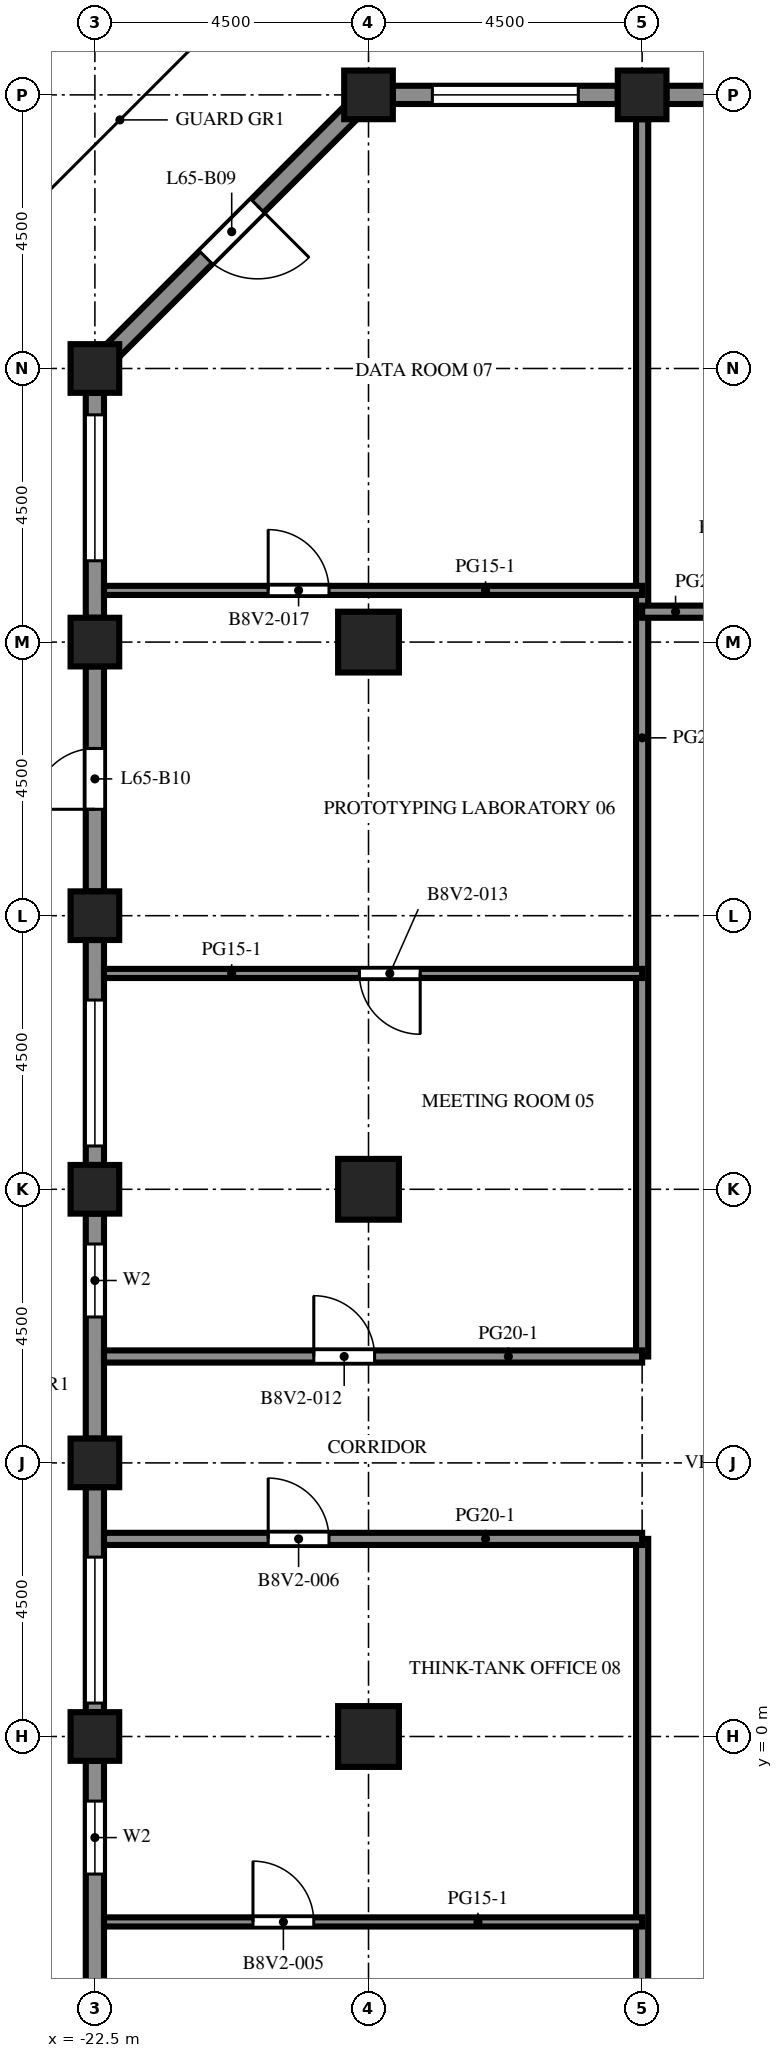
"""IFC4 building model, lengths in metres.
Left out: names, types, materials, properties, quantities, classifications, styles, units other than length and angle.
Written with IfcOpenShell. Run it as: python <this file> out.ifc"""

import sys

from ifc_helpers import new_model, si_unit, direction, frame, frame_2d, origin, origin_2d, place, context, subcontext, project, spatial, rectangle, extrude, element, fill, save


model = new_model("IFC4")
c1 = context("Model", 3, precision=1e-05, world=origin(), true_north=direction((0.0, 1.0)))
c2 = subcontext(c1, "Body", "Model", "MODEL_VIEW")
j1 = project(units=[si_unit("LENGTHUNIT", "METRE"), si_unit("PLANEANGLEUNIT", "RADIAN")], contexts=[c1])
p1 = place(None, origin())
s1 = spatial("IfcSite", under=j1, at=p1, CompositionType="ELEMENT")
p2 = place(p1, origin())
s2 = spatial("IfcBuilding", under=s1, at=p2, CompositionType="ELEMENT")
p3 = place(p2, frame((0.0, 0.0, 286.8)))
s3 = spatial("IfcBuildingStorey", under=s2, at=p3, CompositionType="ELEMENT", Elevation=286.8)
for number, where, z_axis, x_axis in (
    (1, (-22.5, 0.0, 0.0), (0.0, 0.0, 1.0), (1.0, 0.0, 0.0)),
    (2, (-22.5, 4.5, 0.0), (0.0, 0.0, 1.0), (1.0, 0.0, 0.0)),
    (3, (-22.5, 9.0, 0.0), (0.0, 0.0, 1.0), (1.0, 0.0, 0.0)),
    (4, (-22.5, 13.5, 0.0), (0.0, 0.0, 1.0), (1.0, 0.0, 0.0)),
    (5, (-22.5, 18.0, 0.0), (0.0, 0.0, 1.0), (1.0, 0.0, 0.0)),
    (6, (-22.5, 22.5, 0.0), (0.0, 0.0, 1.0), (1.0, 0.0, 0.0)),
    (7, (-18.0, 27.0, 0.0), (0.0, 0.0, 1.0), (1.0, 0.0, 0.0)),
    (8, (-13.5, 27.0, 0.0), (0.0, 0.0, 1.0), (1.0, 0.0, 0.0)),
):
    element("IfcColumn", number, at=place(p3, frame(where, z_axis=z_axis, x_axis=x_axis)), inside=s3, PredefinedType="COLUMN", context=c2, shape_type="SweptSolid", body=[
        extrude(rectangle(XDim=0.8, YDim=0.8, at=origin_2d()), origin(), (0.0, 0.0, 1.0), 4.1),
    ])
for number, where, z_axis, x_axis in (
    (9, (-18.0, 0.0, 0.0), (0.0, 0.0, 1.0), (1.0, 0.0, 0.0)),
    (10, (-18.0, 9.0, 0.0), (0.0, 0.0, 1.0), (1.0, 0.0, 0.0)),
    (11, (-18.0, 18.0, 0.0), (0.0, 0.0, 1.0), (1.0, 0.0, 0.0)),
):
    element("IfcColumn", number, at=place(p3, frame(where, z_axis=z_axis, x_axis=x_axis)), inside=s3, PredefinedType="COLUMN", context=c2, shape_type="SweptSolid", body=[
        extrude(rectangle(XDim=1.0, YDim=1.0, at=origin_2d()), origin(), (0.0, 0.0, 1.0), 4.1),
    ])
p4 = place(p3, frame((-13.1, 27.0, 0.0), z_axis=(0.0, 0.0, 1.0), x_axis=(1.0, 0.0, 0.0)))
e12 = element("IfcWall", 12, at=p4, inside=s3, PredefinedType="SOLIDWALL", context=c2, shape_type="SweptSolid", body=[
    extrude(rectangle(XDim=3.7, YDim=0.3, at=frame_2d((1.85, 0.0))), origin(), (0.0, 0.0, 1.0), 2.85),
])
p5 = place(p4, frame((1.35, 0.0, 0.0)))
e13 = element("IfcOpeningElement", 13, at=p5, cuts=e12, PredefinedType="OPENING", context=c2, shape_type="SweptSolid", body=[
    extrude(rectangle(XDim=1.0, YDim=2.2, at=frame_2d((0.5, 1.1))), frame((0.0, 0.16, 0.0), z_axis=(0.0, -1.0, 0.0), x_axis=(1.0, 0.0, 0.0)), (0.0, 0.0, 1.0), 0.32),
])
p6 = place(p3, frame((-17.6, 27.0, 0.0), z_axis=(0.0, 0.0, 1.0), x_axis=(1.0, 0.0, 0.0)))
e14 = element("IfcWall", 14, at=p6, inside=s3, PredefinedType="SOLIDWALL", context=c2, shape_type="SweptSolid", body=[
    extrude(rectangle(XDim=3.7, YDim=0.3, at=frame_2d((1.85, 0.0))), origin(), (0.0, 0.0, 1.0), 2.85),
])
p7 = place(p6, frame((0.65, 0.0, 0.8)))
e15 = element("IfcOpeningElement", 15, at=p7, cuts=e14, PredefinedType="OPENING", context=c2, shape_type="SweptSolid", body=[
    extrude(rectangle(XDim=2.4, YDim=1.7, at=frame_2d((1.2, 0.85))), frame((0.0, 0.16, 0.0), z_axis=(0.0, -1.0, 0.0), x_axis=(1.0, 0.0, 0.0)), (0.0, 0.0, 1.0), 0.32),
])
p8 = place(p3, frame((-22.206, 22.794, 0.0), z_axis=(0.0, 0.0, 1.0), x_axis=(0.707106781187, 0.707106781187, 0.0)))
e16 = element("IfcWall", 16, at=p8, inside=s3, PredefinedType="SOLIDWALL", context=c2, shape_type="SweptSolid", body=[
    extrude(rectangle(XDim=5.532, YDim=0.3, at=frame_2d((2.766, 0.0))), origin(), (0.0, 0.0, 1.0), 2.85),
])
p9 = place(p8, frame((2.166, 0.0, 0.0)))
e17 = element("IfcOpeningElement", 17, at=p9, cuts=e16, PredefinedType="OPENING", context=c2, shape_type="SweptSolid", body=[
    extrude(rectangle(XDim=1.2, YDim=2.2, at=frame_2d((0.6, 1.1))), frame((0.0, 0.16, 0.0), z_axis=(0.0, -1.0, 0.0), x_axis=(1.0, 0.0, 0.0)), (0.0, 0.0, 1.0), 0.32),
])
p10 = place(p3, frame((-22.5, 18.4, 0.0), z_axis=(0.0, 0.0, 1.0), x_axis=(0.0, 1.0, 0.0)))
e18 = element("IfcWall", 18, at=p10, inside=s3, PredefinedType="SOLIDWALL", context=c2, shape_type="SweptSolid", body=[
    extrude(rectangle(XDim=3.7, YDim=0.3, at=frame_2d((1.85, 0.0))), origin(), (0.0, 0.0, 1.0), 2.85),
])
p11 = place(p10, frame((0.938, 0.0, 0.8)))
e19 = element("IfcOpeningElement", 19, at=p11, cuts=e18, PredefinedType="OPENING", context=c2, shape_type="SweptSolid", body=[
    extrude(rectangle(XDim=2.4, YDim=1.7, at=frame_2d((1.2, 0.85))), frame((0.0, 0.16, 0.0), z_axis=(0.0, -1.0, 0.0), x_axis=(1.0, 0.0, 0.0)), (0.0, 0.0, 1.0), 0.32),
])
p12 = place(p3, frame((-22.5, 13.9, 0.0), z_axis=(0.0, 0.0, 1.0), x_axis=(0.0, 1.0, 0.0)))
e20 = element("IfcWall", 20, at=p12, inside=s3, PredefinedType="SOLIDWALL", context=c2, shape_type="SweptSolid", body=[
    extrude(rectangle(XDim=3.7, YDim=0.3, at=frame_2d((1.85, 0.0))), origin(), (0.0, 0.0, 1.0), 2.85),
])
p13 = place(p12, frame((1.35, 0.0, 0.0)))
e21 = element("IfcOpeningElement", 21, at=p13, cuts=e20, PredefinedType="OPENING", context=c2, shape_type="SweptSolid", body=[
    extrude(rectangle(XDim=1.0, YDim=2.2, at=frame_2d((0.5, 1.1))), frame((0.0, 0.16, 0.0), z_axis=(0.0, -1.0, 0.0), x_axis=(1.0, 0.0, 0.0)), (0.0, 0.0, 1.0), 0.32),
])
p14 = place(p3, frame((-22.5, 9.4, 0.0), z_axis=(0.0, 0.0, 1.0), x_axis=(0.0, 1.0, 0.0)))
e22 = element("IfcWall", 22, at=p14, inside=s3, PredefinedType="SOLIDWALL", context=c2, shape_type="SweptSolid", body=[
    extrude(rectangle(XDim=3.7, YDim=0.3, at=frame_2d((1.85, 0.0))), origin(), (0.0, 0.0, 1.0), 2.85),
])
p15 = place(p14, frame((0.312, 0.0, 0.8)))
e23 = element("IfcOpeningElement", 23, at=p15, cuts=e22, PredefinedType="OPENING", context=c2, shape_type="SweptSolid", body=[
    extrude(rectangle(XDim=2.4, YDim=1.7, at=frame_2d((1.2, 0.85))), frame((0.0, 0.16, 0.0), z_axis=(0.0, -1.0, 0.0), x_axis=(1.0, 0.0, 0.0)), (0.0, 0.0, 1.0), 0.32),
])
p16 = place(p3, frame((-22.5, 4.9, 0.0), z_axis=(0.0, 0.0, 1.0), x_axis=(0.0, 1.0, 0.0)))
e24 = element("IfcWall", 24, at=p16, inside=s3, PredefinedType="SOLIDWALL", context=c2, shape_type="SweptSolid", body=[
    extrude(rectangle(XDim=3.7, YDim=0.3, at=frame_2d((1.85, 0.0))), origin(), (0.0, 0.0, 1.0), 2.85),
])
p17 = place(p16, frame((2.0, 0.0, 0.8)))
e25 = element("IfcOpeningElement", 25, at=p17, cuts=e24, PredefinedType="OPENING", context=c2, shape_type="SweptSolid", body=[
    extrude(rectangle(XDim=1.2, YDim=1.7, at=frame_2d((0.6, 0.85))), frame((0.0, 0.16, 0.0), z_axis=(0.0, -1.0, 0.0), x_axis=(1.0, 0.0, 0.0)), (0.0, 0.0, 1.0), 0.32),
])
p18 = place(p3, frame((-22.5, 0.4, 0.0), z_axis=(0.0, 0.0, 1.0), x_axis=(0.0, 1.0, 0.0)))
e26 = element("IfcWall", 26, at=p18, inside=s3, PredefinedType="SOLIDWALL", context=c2, shape_type="SweptSolid", body=[
    extrude(rectangle(XDim=3.7, YDim=0.3, at=frame_2d((1.85, 0.0))), origin(), (0.0, 0.0, 1.0), 2.85),
])
p19 = place(p18, frame((0.15, 0.0, 0.8)))
e27 = element("IfcOpeningElement", 27, at=p19, cuts=e26, PredefinedType="OPENING", context=c2, shape_type="SweptSolid", body=[
    extrude(rectangle(XDim=2.4, YDim=1.7, at=frame_2d((1.2, 0.85))), frame((0.0, 0.16, 0.0), z_axis=(0.0, -1.0, 0.0), x_axis=(1.0, 0.0, 0.0)), (0.0, 0.0, 1.0), 0.32),
])
p20 = place(p3, frame((-22.5, -4.1, 0.0), z_axis=(0.0, 0.0, 1.0), x_axis=(0.0, 1.0, 0.0)))
e28 = element("IfcWall", 28, at=p20, inside=s3, PredefinedType="SOLIDWALL", context=c2, shape_type="SweptSolid", body=[
    extrude(rectangle(XDim=3.7, YDim=0.3, at=frame_2d((1.85, 0.0))), origin(), (0.0, 0.0, 1.0), 2.85),
])
p21 = place(p20, frame((1.837, 0.0, 0.8)))
e29 = element("IfcOpeningElement", 29, at=p21, cuts=e28, PredefinedType="OPENING", context=c2, shape_type="SweptSolid", body=[
    extrude(rectangle(XDim=1.2, YDim=1.7, at=frame_2d((0.6, 0.85))), frame((0.0, 0.16, 0.0), z_axis=(0.0, -1.0, 0.0), x_axis=(1.0, 0.0, 0.0)), (0.0, 0.0, 1.0), 0.32),
])
p22 = place(p3, frame((-13.5, -17.6, 0.0), z_axis=(0.0, 0.0, 1.0), x_axis=(0.0, 1.0, 0.0)))
e30 = element("IfcWall", 30, at=p22, inside=s3, PredefinedType="PARTITIONING", context=c2, shape_type="SweptSolid", body=[
    extrude(rectangle(XDim=20.85, YDim=0.2, at=frame_2d((10.425, 0.0))), origin(), (0.0, 0.0, 1.0), 3.65),
])
p23 = place(p3, frame((-13.5, 6.25, 0.0), z_axis=(0.0, 0.0, 1.0), x_axis=(0.0, 1.0, 0.0)))
e31 = element("IfcWall", 31, at=p23, inside=s3, PredefinedType="PARTITIONING", context=c2, shape_type="SweptSolid", body=[
    extrude(rectangle(XDim=20.35, YDim=0.2, at=frame_2d((10.175, 0.0))), origin(), (0.0, 0.0, 1.0), 3.65),
])
p24 = place(p3, frame((-13.5, -3.05, 0.0), z_axis=(0.0, 0.0, 1.0), x_axis=(-1.0, 0.0, 0.0)))
e32 = element("IfcWall", 32, at=p24, inside=s3, PredefinedType="PARTITIONING", context=c2, shape_type="SweptSolid", body=[
    extrude(rectangle(XDim=8.85, YDim=0.15, at=frame_2d((4.425, 0.0))), origin(), (0.0, 0.0, 1.0), 3.65),
])
p25 = place(p24, frame((5.4, 0.0, 0.0)))
e33 = element("IfcOpeningElement", 33, at=p25, cuts=e32, PredefinedType="OPENING", context=c2, shape_type="SweptSolid", body=[
    extrude(rectangle(XDim=1.0, YDim=2.1, at=frame_2d((0.5, 1.05))), frame((0.0, 0.085, 0.0), z_axis=(0.0, -1.0, 0.0), x_axis=(1.0, 0.0, 0.0)), (0.0, 0.0, 1.0), 0.17),
])
p26 = place(p3, frame((-13.5, 3.25, 0.0), z_axis=(0.0, 0.0, 1.0), x_axis=(-1.0, 0.0, 0.0)))
e34 = element("IfcWall", 34, at=p26, inside=s3, PredefinedType="PARTITIONING", context=c2, shape_type="SweptSolid", body=[
    extrude(rectangle(XDim=8.85, YDim=0.2, at=frame_2d((4.425, 0.0))), origin(), (0.0, 0.0, 1.0), 3.65),
])
p27 = place(p26, frame((5.15, 0.0, 0.0)))
e35 = element("IfcOpeningElement", 35, at=p27, cuts=e34, PredefinedType="OPENING", context=c2, shape_type="SweptSolid", body=[
    extrude(rectangle(XDim=1.0, YDim=2.1, at=frame_2d((0.5, 1.05))), frame((0.0, 0.11, 0.0), z_axis=(0.0, -1.0, 0.0), x_axis=(1.0, 0.0, 0.0)), (0.0, 0.0, 1.0), 0.22),
])
p28 = place(p3, frame((-22.35, 6.25, 0.0), z_axis=(0.0, 0.0, 1.0), x_axis=(1.0, 0.0, 0.0)))
e36 = element("IfcWall", 36, at=p28, inside=s3, PredefinedType="PARTITIONING", context=c2, shape_type="SweptSolid", body=[
    extrude(rectangle(XDim=8.85, YDim=0.2, at=frame_2d((4.425, 0.0))), origin(), (0.0, 0.0, 1.0), 3.65),
])
p29 = place(p28, frame((3.45, 0.0, 0.0)))
e37 = element("IfcOpeningElement", 37, at=p29, cuts=e36, PredefinedType="OPENING", context=c2, shape_type="SweptSolid", body=[
    extrude(rectangle(XDim=1.0, YDim=2.1, at=frame_2d((0.5, 1.05))), frame((0.0, 0.11, 0.0), z_axis=(0.0, -1.0, 0.0), x_axis=(1.0, 0.0, 0.0)), (0.0, 0.0, 1.0), 0.22),
])
p30 = place(p3, frame((-22.35, 12.55, 0.0), z_axis=(0.0, 0.0, 1.0), x_axis=(1.0, 0.0, 0.0)))
e38 = element("IfcWall", 38, at=p30, inside=s3, PredefinedType="PARTITIONING", context=c2, shape_type="SweptSolid", body=[
    extrude(rectangle(XDim=8.85, YDim=0.15, at=frame_2d((4.425, 0.0))), origin(), (0.0, 0.0, 1.0), 3.65),
])
p31 = place(p30, frame((4.2, 0.0, 0.0)))
e39 = element("IfcOpeningElement", 39, at=p31, cuts=e38, PredefinedType="OPENING", context=c2, shape_type="SweptSolid", body=[
    extrude(rectangle(XDim=1.0, YDim=2.1, at=frame_2d((0.5, 1.05))), frame((0.0, 0.085, 0.0), z_axis=(0.0, -1.0, 0.0), x_axis=(1.0, 0.0, 0.0)), (0.0, 0.0, 1.0), 0.17),
])
p32 = place(p3, frame((-13.5, 18.5, 0.0), z_axis=(0.0, 0.0, 1.0), x_axis=(1.0, 0.0, 0.0)))
e40 = element("IfcWall", 40, at=p32, inside=s3, PredefinedType="PARTITIONING", context=c2, shape_type="SweptSolid", body=[
    extrude(rectangle(XDim=3.0, YDim=0.2, at=frame_2d((1.5, 0.0))), origin(), (0.0, 0.0, 1.0), 3.65),
])
p33 = place(p32, frame((1.1, 0.0, 0.0)))
e41 = element("IfcOpeningElement", 41, at=p33, cuts=e40, PredefinedType="OPENING", context=c2, shape_type="SweptSolid", body=[
    extrude(rectangle(XDim=1.0, YDim=2.1, at=frame_2d((0.5, 1.05))), frame((0.0, 0.11, 0.0), z_axis=(0.0, -1.0, 0.0), x_axis=(1.0, 0.0, 0.0)), (0.0, 0.0, 1.0), 0.22),
])
p34 = place(p3, frame((-22.35, 18.85, 0.0), z_axis=(0.0, 0.0, 1.0), x_axis=(1.0, 0.0, 0.0)))
e42 = element("IfcWall", 42, at=p34, inside=s3, PredefinedType="PARTITIONING", context=c2, shape_type="SweptSolid", body=[
    extrude(rectangle(XDim=8.85, YDim=0.15, at=frame_2d((4.425, 0.0))), origin(), (0.0, 0.0, 1.0), 3.65),
])
p35 = place(p34, frame((2.7, 0.0, 0.0)))
e43 = element("IfcOpeningElement", 43, at=p35, cuts=e42, PredefinedType="OPENING", context=c2, shape_type="SweptSolid", body=[
    extrude(rectangle(XDim=1.0, YDim=2.1, at=frame_2d((0.5, 1.05))), frame((0.0, 0.085, 0.0), z_axis=(0.0, -1.0, 0.0), x_axis=(1.0, 0.0, 0.0)), (0.0, 0.0, 1.0), 0.17),
])
p36 = place(p7, origin())
e44 = element("IfcWindow", 44, at=p36, inside=s3, PartitioningType="SINGLE_PANEL", PredefinedType="WINDOW", context=c2, shape_type="SweptSolid", body=[
    extrude(rectangle(XDim=2.4, YDim=1.7, at=frame_2d((1.2, 0.85))), frame((0.0, 0.03, 0.0), z_axis=(0.0, -1.0, 0.0), x_axis=(1.0, 0.0, 0.0)), (0.0, 0.0, 1.0), 0.06),
])
fill(e15, e44)
p37 = place(p9, origin())
e45 = element("IfcDoor", 45, at=p37, inside=s3, OperationType="SINGLE_SWING_RIGHT", PredefinedType="DOOR", context=c2, shape_type="SweptSolid", body=[
    extrude(rectangle(XDim=1.2, YDim=2.2, at=frame_2d((0.6, 1.1))), frame((0.0, 0.025, 0.0), z_axis=(0.0, -1.0, 0.0), x_axis=(1.0, 0.0, 0.0)), (0.0, 0.0, 1.0), 0.05),
])
fill(e17, e45)
p38 = place(p11, origin())
e46 = element("IfcWindow", 46, at=p38, inside=s3, PartitioningType="SINGLE_PANEL", PredefinedType="WINDOW", context=c2, shape_type="SweptSolid", body=[
    extrude(rectangle(XDim=2.4, YDim=1.7, at=frame_2d((1.2, 0.85))), frame((0.0, 0.03, 0.0), z_axis=(0.0, -1.0, 0.0), x_axis=(1.0, 0.0, 0.0)), (0.0, 0.0, 1.0), 0.06),
])
fill(e19, e46)
p39 = place(p13, origin())
e47 = element("IfcDoor", 47, at=p39, inside=s3, OperationType="SINGLE_SWING_LEFT", PredefinedType="DOOR", context=c2, shape_type="SweptSolid", body=[
    extrude(rectangle(XDim=1.0, YDim=2.2, at=frame_2d((0.5, 1.1))), frame((0.0, 0.025, 0.0), z_axis=(0.0, -1.0, 0.0), x_axis=(1.0, 0.0, 0.0)), (0.0, 0.0, 1.0), 0.05),
])
fill(e21, e47)
p40 = place(p15, origin())
e48 = element("IfcWindow", 48, at=p40, inside=s3, PartitioningType="SINGLE_PANEL", PredefinedType="WINDOW", context=c2, shape_type="SweptSolid", body=[
    extrude(rectangle(XDim=2.4, YDim=1.7, at=frame_2d((1.2, 0.85))), frame((0.0, 0.03, 0.0), z_axis=(0.0, -1.0, 0.0), x_axis=(1.0, 0.0, 0.0)), (0.0, 0.0, 1.0), 0.06),
])
fill(e23, e48)
p41 = place(p17, origin())
e49 = element("IfcWindow", 49, at=p41, inside=s3, PartitioningType="SINGLE_PANEL", PredefinedType="WINDOW", context=c2, shape_type="SweptSolid", body=[
    extrude(rectangle(XDim=1.2, YDim=1.7, at=frame_2d((0.6, 0.85))), frame((0.0, 0.03, 0.0), z_axis=(0.0, -1.0, 0.0), x_axis=(1.0, 0.0, 0.0)), (0.0, 0.0, 1.0), 0.06),
])
fill(e25, e49)
p42 = place(p19, origin())
e50 = element("IfcWindow", 50, at=p42, inside=s3, PartitioningType="SINGLE_PANEL", PredefinedType="WINDOW", context=c2, shape_type="SweptSolid", body=[
    extrude(rectangle(XDim=2.4, YDim=1.7, at=frame_2d((1.2, 0.85))), frame((0.0, 0.03, 0.0), z_axis=(0.0, -1.0, 0.0), x_axis=(1.0, 0.0, 0.0)), (0.0, 0.0, 1.0), 0.06),
])
fill(e27, e50)
p43 = place(p21, origin())
e51 = element("IfcWindow", 51, at=p43, inside=s3, PartitioningType="SINGLE_PANEL", PredefinedType="WINDOW", context=c2, shape_type="SweptSolid", body=[
    extrude(rectangle(XDim=1.2, YDim=1.7, at=frame_2d((0.6, 0.85))), frame((0.0, 0.03, 0.0), z_axis=(0.0, -1.0, 0.0), x_axis=(1.0, 0.0, 0.0)), (0.0, 0.0, 1.0), 0.06),
])
fill(e29, e51)
p44 = place(p25, origin())
e52 = element("IfcDoor", 52, at=p44, inside=s3, OperationType="SINGLE_SWING_RIGHT", PredefinedType="DOOR", context=c2, shape_type="SweptSolid", body=[
    extrude(rectangle(XDim=1.0, YDim=2.1, at=frame_2d((0.5, 1.05))), frame((0.0, 0.025, 0.0), z_axis=(0.0, -1.0, 0.0), x_axis=(1.0, 0.0, 0.0)), (0.0, 0.0, 1.0), 0.05),
])
fill(e33, e52)
p45 = place(p27, origin())
e53 = element("IfcDoor", 53, at=p45, inside=s3, OperationType="SINGLE_SWING_RIGHT", PredefinedType="DOOR", context=c2, shape_type="SweptSolid", body=[
    extrude(rectangle(XDim=1.0, YDim=2.1, at=frame_2d((0.5, 1.05))), frame((0.0, 0.025, 0.0), z_axis=(0.0, -1.0, 0.0), x_axis=(1.0, 0.0, 0.0)), (0.0, 0.0, 1.0), 0.05),
])
fill(e35, e53)
p46 = place(p29, origin())
e54 = element("IfcDoor", 54, at=p46, inside=s3, OperationType="SINGLE_SWING_LEFT", PredefinedType="DOOR", context=c2, shape_type="SweptSolid", body=[
    extrude(rectangle(XDim=1.0, YDim=2.1, at=frame_2d((0.5, 1.05))), frame((0.0, 0.025, 0.0), z_axis=(0.0, -1.0, 0.0), x_axis=(1.0, 0.0, 0.0)), (0.0, 0.0, 1.0), 0.05),
])
fill(e37, e54)
p47 = place(p31, origin())
e55 = element("IfcDoor", 55, at=p47, inside=s3, OperationType="SINGLE_SWING_RIGHT", PredefinedType="DOOR", context=c2, shape_type="SweptSolid", body=[
    extrude(rectangle(XDim=1.0, YDim=2.1, at=frame_2d((0.5, 1.05))), frame((0.0, 0.025, 0.0), z_axis=(0.0, -1.0, 0.0), x_axis=(1.0, 0.0, 0.0)), (0.0, 0.0, 1.0), 0.05),
])
fill(e39, e55)
p48 = place(p35, origin())
e56 = element("IfcDoor", 56, at=p48, inside=s3, OperationType="SINGLE_SWING_LEFT", PredefinedType="DOOR", context=c2, shape_type="SweptSolid", body=[
    extrude(rectangle(XDim=1.0, YDim=2.1, at=frame_2d((0.5, 1.05))), frame((0.0, 0.025, 0.0), z_axis=(0.0, -1.0, 0.0), x_axis=(1.0, 0.0, 0.0)), (0.0, 0.0, 1.0), 0.05),
])
fill(e43, e56)
save(model, sys.argv[1])
